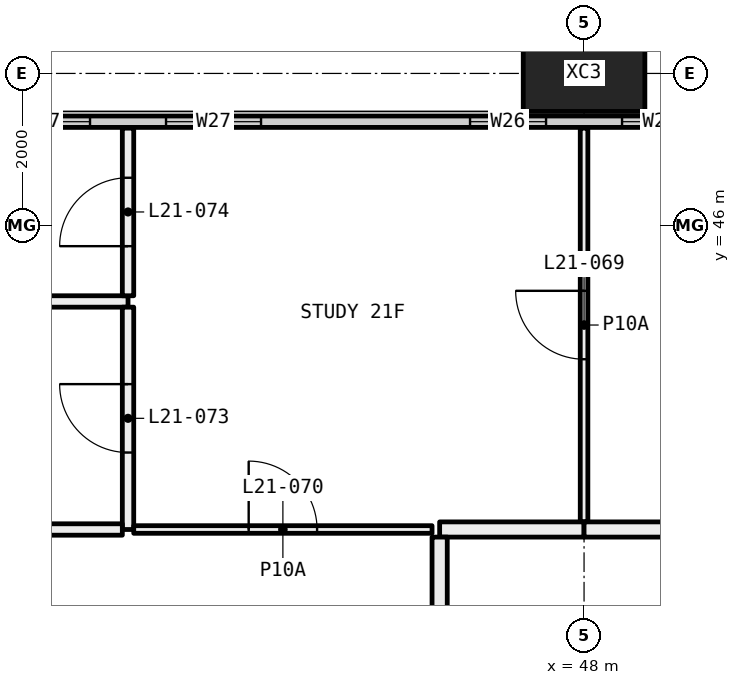
"""IFC4 building model, lengths in metres.
Left out: names, types, materials, properties, quantities, classifications, styles, units other than length and angle.
Written with IfcOpenShell. Run it as: python <this file> out.ifc"""

import sys

from ifc_helpers import new_model, si_unit, direction, frame, frame_2d, origin, origin_2d, place, context, subcontext, project, spatial, rectangle, hollow_rectangle, extrude, element, fill, save


model = new_model("IFC4")
c1 = context("Model", 3, precision=1e-05, world=origin(), true_north=direction((0.0, 1.0)))
c2 = subcontext(c1, "Body", "Model", "MODEL_VIEW")
j1 = project(units=[si_unit("LENGTHUNIT", "METRE"), si_unit("PLANEANGLEUNIT", "RADIAN")], contexts=[c1])
p1 = place(None, origin())
s1 = spatial("IfcSite", under=j1, at=p1, CompositionType="ELEMENT")
p2 = place(p1, origin())
s2 = spatial("IfcBuilding", under=s1, at=p2, CompositionType="ELEMENT")
p3 = place(p2, frame((0.0, 0.0, 85.2)))
s3 = spatial("IfcBuildingStorey", under=s2, at=p3, CompositionType="ELEMENT", Elevation=85.2)
p4 = place(p3, frame((48.0, 48.0, -0.4), z_axis=(0.0, 0.0, 1.0), x_axis=(1.0, 0.0, 0.0)))
e1 = element("IfcColumn", 1, at=p4, inside=s3, PredefinedType="COLUMN", context=c2, shape_type="SweptSolid", body=[
    extrude(hollow_rectangle(XDim=1.6, YDim=1.0, WallThickness=0.065, at=origin_2d()), origin(), (0.0, 0.0, 1.0), 3.45),
])
p5 = place(p3, frame((6.56, 47.365, 0.0), z_axis=(0.0, 0.0, 1.0), x_axis=(1.0, 0.0, 0.0)))
e2 = element("IfcWall", 2, at=p5, inside=s3, PredefinedType="ELEMENTEDWALL", context=c2, shape_type="SweptSolid", body=[
    extrude(rectangle(XDim=58.88, YDim=0.15, at=frame_2d((29.44, 0.0))), origin(), (0.0, 0.0, 1.0), 3.05),
])
p6 = place(p5, frame((0.44, 0.0, 0.45)))
e3 = element("IfcOpeningElement", 3, at=p6, cuts=e2, PredefinedType="OPENING", context=c2, shape_type="SweptSolid", body=[
    extrude(rectangle(XDim=4.5, YDim=2.55, at=frame_2d((2.25, 1.275))), frame((0.0, 0.085, 0.0), z_axis=(0.0, -1.0, 0.0), x_axis=(1.0, 0.0, 0.0)), (0.0, 0.0, 1.0), 0.17),
])
p7 = place(p5, frame((5.94, 0.0, 0.45)))
e4 = element("IfcOpeningElement", 4, at=p7, cuts=e2, PredefinedType="OPENING", context=c2, shape_type="SweptSolid", body=[
    extrude(rectangle(XDim=1.0, YDim=2.55, at=frame_2d((0.5, 1.275))), frame((0.0, 0.085, 0.0), z_axis=(0.0, -1.0, 0.0), x_axis=(1.0, 0.0, 0.0)), (0.0, 0.0, 1.0), 0.17),
])
p8 = place(p5, frame((9.69, 0.0, 0.45)))
e5 = element("IfcOpeningElement", 5, at=p8, cuts=e2, PredefinedType="OPENING", context=c2, shape_type="SweptSolid", body=[
    extrude(rectangle(XDim=1.25, YDim=2.55, at=frame_2d((0.625, 1.275))), frame((0.0, 0.085, 0.0), z_axis=(0.0, -1.0, 0.0), x_axis=(1.0, 0.0, 0.0)), (0.0, 0.0, 1.0), 0.17),
])
p9 = place(p5, frame((11.94, 0.0, 0.45)))
e6 = element("IfcOpeningElement", 6, at=p9, cuts=e2, PredefinedType="OPENING", context=c2, shape_type="SweptSolid", body=[
    extrude(rectangle(XDim=1.25, YDim=2.55, at=frame_2d((0.625, 1.275))), frame((0.0, 0.085, 0.0), z_axis=(0.0, -1.0, 0.0), x_axis=(1.0, 0.0, 0.0)), (0.0, 0.0, 1.0), 0.17),
])
p10 = place(p5, frame((15.94, 0.0, 0.45)))
e7 = element("IfcOpeningElement", 7, at=p10, cuts=e2, PredefinedType="OPENING", context=c2, shape_type="SweptSolid", body=[
    extrude(rectangle(XDim=1.0, YDim=2.55, at=frame_2d((0.5, 1.275))), frame((0.0, 0.085, 0.0), z_axis=(0.0, -1.0, 0.0), x_axis=(1.0, 0.0, 0.0)), (0.0, 0.0, 1.0), 0.17),
])
p11 = place(p5, frame((17.94, 0.0, 0.45)))
e8 = element("IfcOpeningElement", 8, at=p11, cuts=e2, PredefinedType="OPENING", context=c2, shape_type="SweptSolid", body=[
    extrude(rectangle(XDim=1.0, YDim=2.55, at=frame_2d((0.5, 1.275))), frame((0.0, 0.085, 0.0), z_axis=(0.0, -1.0, 0.0), x_axis=(1.0, 0.0, 0.0)), (0.0, 0.0, 1.0), 0.17),
])
p12 = place(p5, frame((21.69, 0.0, 0.45)))
e9 = element("IfcOpeningElement", 9, at=p12, cuts=e2, PredefinedType="OPENING", context=c2, shape_type="SweptSolid", body=[
    extrude(rectangle(XDim=1.25, YDim=2.55, at=frame_2d((0.625, 1.275))), frame((0.0, 0.085, 0.0), z_axis=(0.0, -1.0, 0.0), x_axis=(1.0, 0.0, 0.0)), (0.0, 0.0, 1.0), 0.17),
])
p13 = place(p5, frame((23.94, 0.0, 0.45)))
e10 = element("IfcOpeningElement", 10, at=p13, cuts=e2, PredefinedType="OPENING", context=c2, shape_type="SweptSolid", body=[
    extrude(rectangle(XDim=1.25, YDim=2.55, at=frame_2d((0.625, 1.275))), frame((0.0, 0.085, 0.0), z_axis=(0.0, -1.0, 0.0), x_axis=(1.0, 0.0, 0.0)), (0.0, 0.0, 1.0), 0.17),
])
p14 = place(p5, frame((27.94, 0.0, 0.45)))
e11 = element("IfcOpeningElement", 11, at=p14, cuts=e2, PredefinedType="OPENING", context=c2, shape_type="SweptSolid", body=[
    extrude(rectangle(XDim=1.0, YDim=2.55, at=frame_2d((0.5, 1.275))), frame((0.0, 0.085, 0.0), z_axis=(0.0, -1.0, 0.0), x_axis=(1.0, 0.0, 0.0)), (0.0, 0.0, 1.0), 0.17),
])
p15 = place(p5, frame((29.94, 0.0, 0.45)))
e12 = element("IfcOpeningElement", 12, at=p15, cuts=e2, PredefinedType="OPENING", context=c2, shape_type="SweptSolid", body=[
    extrude(rectangle(XDim=1.0, YDim=2.55, at=frame_2d((0.5, 1.275))), frame((0.0, 0.085, 0.0), z_axis=(0.0, -1.0, 0.0), x_axis=(1.0, 0.0, 0.0)), (0.0, 0.0, 1.0), 0.17),
])
p16 = place(p5, frame((33.69, 0.0, 0.45)))
e13 = element("IfcOpeningElement", 13, at=p16, cuts=e2, PredefinedType="OPENING", context=c2, shape_type="SweptSolid", body=[
    extrude(rectangle(XDim=1.25, YDim=2.55, at=frame_2d((0.625, 1.275))), frame((0.0, 0.085, 0.0), z_axis=(0.0, -1.0, 0.0), x_axis=(1.0, 0.0, 0.0)), (0.0, 0.0, 1.0), 0.17),
])
p17 = place(p5, frame((35.94, 0.0, 0.45)))
e14 = element("IfcOpeningElement", 14, at=p17, cuts=e2, PredefinedType="OPENING", context=c2, shape_type="SweptSolid", body=[
    extrude(rectangle(XDim=1.25, YDim=2.55, at=frame_2d((0.625, 1.275))), frame((0.0, 0.085, 0.0), z_axis=(0.0, -1.0, 0.0), x_axis=(1.0, 0.0, 0.0)), (0.0, 0.0, 1.0), 0.17),
])
p18 = place(p5, frame((39.94, 0.0, 0.45)))
e15 = element("IfcOpeningElement", 15, at=p18, cuts=e2, PredefinedType="OPENING", context=c2, shape_type="SweptSolid", body=[
    extrude(rectangle(XDim=1.0, YDim=2.55, at=frame_2d((0.5, 1.275))), frame((0.0, 0.085, 0.0), z_axis=(0.0, -1.0, 0.0), x_axis=(1.0, 0.0, 0.0)), (0.0, 0.0, 1.0), 0.17),
])
p19 = place(p5, frame((41.94, 0.0, 0.45)))
e16 = element("IfcOpeningElement", 16, at=p19, cuts=e2, PredefinedType="OPENING", context=c2, shape_type="SweptSolid", body=[
    extrude(rectangle(XDim=1.0, YDim=2.55, at=frame_2d((0.5, 1.275))), frame((0.0, 0.085, 0.0), z_axis=(0.0, -1.0, 0.0), x_axis=(1.0, 0.0, 0.0)), (0.0, 0.0, 1.0), 0.17),
])
p20 = place(p5, frame((45.69, 0.0, 0.45)))
e17 = element("IfcOpeningElement", 17, at=p20, cuts=e2, PredefinedType="OPENING", context=c2, shape_type="SweptSolid", body=[
    extrude(rectangle(XDim=1.25, YDim=2.55, at=frame_2d((0.625, 1.275))), frame((0.0, 0.085, 0.0), z_axis=(0.0, -1.0, 0.0), x_axis=(1.0, 0.0, 0.0)), (0.0, 0.0, 1.0), 0.17),
])
p21 = place(p5, frame((47.94, 0.0, 0.45)))
e18 = element("IfcOpeningElement", 18, at=p21, cuts=e2, PredefinedType="OPENING", context=c2, shape_type="SweptSolid", body=[
    extrude(rectangle(XDim=1.25, YDim=2.55, at=frame_2d((0.625, 1.275))), frame((0.0, 0.085, 0.0), z_axis=(0.0, -1.0, 0.0), x_axis=(1.0, 0.0, 0.0)), (0.0, 0.0, 1.0), 0.17),
])
p22 = place(p5, frame((51.94, 0.0, 0.45)))
e19 = element("IfcOpeningElement", 19, at=p22, cuts=e2, PredefinedType="OPENING", context=c2, shape_type="SweptSolid", body=[
    extrude(rectangle(XDim=1.0, YDim=2.55, at=frame_2d((0.5, 1.275))), frame((0.0, 0.085, 0.0), z_axis=(0.0, -1.0, 0.0), x_axis=(1.0, 0.0, 0.0)), (0.0, 0.0, 1.0), 0.17),
])
p23 = place(p5, frame((53.94, 0.0, 0.45)))
e20 = element("IfcOpeningElement", 20, at=p23, cuts=e2, PredefinedType="OPENING", context=c2, shape_type="SweptSolid", body=[
    extrude(rectangle(XDim=4.5, YDim=2.55, at=frame_2d((2.25, 1.275))), frame((0.0, 0.085, 0.0), z_axis=(0.0, -1.0, 0.0), x_axis=(1.0, 0.0, 0.0)), (0.0, 0.0, 1.0), 0.17),
])
p24 = place(p3, frame((42.0, 45.0, 0.0), z_axis=(0.0, 0.0, 1.0), x_axis=(-1.0, 0.0, 0.0)))
e21 = element("IfcWall", 21, at=p24, inside=s3, PredefinedType="PARTITIONING", context=c2, shape_type="SweptSolid", body=[
    extrude(rectangle(XDim=5.9, YDim=0.15, at=frame_2d((2.95, 0.0))), origin(), (0.0, 0.0, 1.0), 3.05),
])
p25 = place(p3, frame((42.0, 42.0, 0.0), z_axis=(0.0, 0.0, 1.0), x_axis=(0.0, 1.0, 0.0)))
e22 = element("IfcWall", 22, at=p25, inside=s3, PredefinedType="PARTITIONING", context=c2, shape_type="SweptSolid", body=[
    extrude(rectangle(XDim=2.925, YDim=0.15, at=frame_2d((1.462, 0.0))), origin(), (0.0, 0.0, 1.0), 3.05),
])
p26 = place(p25, frame((1.012, 0.0, 0.0)))
e23 = element("IfcOpeningElement", 23, at=p26, cuts=e22, PredefinedType="OPENING", context=c2, shape_type="SweptSolid", body=[
    extrude(rectangle(XDim=0.9, YDim=2.1, at=frame_2d((0.45, 1.05))), frame((0.0, 0.085, 0.0), z_axis=(0.0, -1.0, 0.0), x_axis=(1.0, 0.0, 0.0)), (0.0, 0.0, 1.0), 0.17),
])
p27 = place(p3, frame((40.9, 42.0, 0.0), z_axis=(0.0, 0.0, 1.0), x_axis=(1.0, 0.0, 0.0)))
e24 = element("IfcWall", 24, at=p27, inside=s3, PredefinedType="PARTITIONING", context=c2, shape_type="SweptSolid", body=[
    extrude(rectangle(XDim=1.025, YDim=0.15, at=frame_2d((0.513, 0.0))), origin(), (0.0, 0.0, 1.0), 3.05),
])
p28 = place(p3, frame((42.0, 45.075, 0.0), z_axis=(0.0, 0.0, 1.0), x_axis=(0.0, 1.0, 0.0)))
e25 = element("IfcWall", 25, at=p28, inside=s3, PredefinedType="PARTITIONING", context=c2, shape_type="SweptSolid", body=[
    extrude(rectangle(XDim=2.205, YDim=0.15, at=frame_2d((1.103, 0.0))), origin(), (0.0, 0.0, 1.0), 3.05),
])
p29 = place(p28, frame((0.653, 0.0, 0.0)))
e26 = element("IfcOpeningElement", 26, at=p29, cuts=e25, PredefinedType="OPENING", context=c2, shape_type="SweptSolid", body=[
    extrude(rectangle(XDim=0.9, YDim=2.1, at=frame_2d((0.45, 1.05))), frame((0.0, 0.085, 0.0), z_axis=(0.0, -1.0, 0.0), x_axis=(1.0, 0.0, 0.0)), (0.0, 0.0, 1.0), 0.17),
])
p30 = place(p3, frame((48.0, 42.1, 0.0), z_axis=(0.0, 0.0, 1.0), x_axis=(0.0, 1.0, 0.0)))
e27 = element("IfcWall", 27, at=p30, inside=s3, PredefinedType="PARTITIONING", context=c2, shape_type="SweptSolid", body=[
    extrude(rectangle(XDim=5.18, YDim=0.1, at=frame_2d((2.59, 0.0))), origin(), (0.0, 0.0, 1.0), 3.05),
])
p31 = place(p30, frame((2.14, 0.0, 0.0)))
e28 = element("IfcOpeningElement", 28, at=p31, cuts=e27, PredefinedType="OPENING", context=c2, shape_type="SweptSolid", body=[
    extrude(rectangle(XDim=0.9, YDim=2.1, at=frame_2d((0.45, 1.05))), frame((0.0, 0.06, 0.0), z_axis=(0.0, -1.0, 0.0), x_axis=(1.0, 0.0, 0.0)), (0.0, 0.0, 1.0), 0.12),
])
p32 = place(p3, frame((42.075, 42.0, 0.0), z_axis=(0.0, 0.0, 1.0), x_axis=(1.0, 0.0, 0.0)))
e29 = element("IfcWall", 29, at=p32, inside=s3, PredefinedType="PARTITIONING", context=c2, shape_type="SweptSolid", body=[
    extrude(rectangle(XDim=3.925, YDim=0.1, at=frame_2d((1.962, 0.0))), origin(), (0.0, 0.0, 1.0), 3.05),
])
p33 = place(p32, frame((1.512, 0.0, 0.0)))
e30 = element("IfcOpeningElement", 30, at=p33, cuts=e29, PredefinedType="OPENING", context=c2, shape_type="SweptSolid", body=[
    extrude(rectangle(XDim=0.9, YDim=2.1, at=frame_2d((0.45, 1.05))), frame((0.0, 0.06, 0.0), z_axis=(0.0, -1.0, 0.0), x_axis=(1.0, 0.0, 0.0)), (0.0, 0.0, 1.0), 0.12),
])
p34 = place(p3, frame((46.1, 42.0, 0.0), z_axis=(0.0, 0.0, 1.0), x_axis=(1.0, 0.0, 0.0)))
e31 = element("IfcWall", 31, at=p34, inside=s3, PredefinedType="PARTITIONING", context=c2, shape_type="SweptSolid", body=[
    extrude(rectangle(XDim=1.9, YDim=0.2, at=frame_2d((0.95, 0.0))), origin(), (0.0, 0.0, 1.0), 3.05),
])
p35 = place(p3, frame((48.0, 42.0, 0.0), z_axis=(0.0, 0.0, 1.0), x_axis=(1.0, 0.0, 0.0)))
e32 = element("IfcWall", 32, at=p35, inside=s3, PredefinedType="PARTITIONING", context=c2, shape_type="SweptSolid", body=[
    extrude(rectangle(XDim=6.0, YDim=0.2, at=frame_2d((3.0, 0.0))), origin(), (0.0, 0.0, 1.0), 3.05),
])
p36 = place(p3, frame((46.1, 36.1, 0.0), z_axis=(0.0, 0.0, 1.0), x_axis=(0.0, 1.0, 0.0)))
e33 = element("IfcWall", 33, at=p36, inside=s3, PredefinedType="PARTITIONING", context=c2, shape_type="SweptSolid", body=[
    extrude(rectangle(XDim=5.8, YDim=0.2, at=frame_2d((2.9, 0.0))), origin(), (0.0, 0.0, 1.0), 3.05),
])
p37 = place(p16, origin())
e34 = element("IfcWindow", 34, at=p37, inside=s3, PartitioningType="SINGLE_PANEL", PredefinedType="WINDOW", context=c2, shape_type="SweptSolid", body=[
    extrude(rectangle(XDim=1.25, YDim=2.55, at=frame_2d((0.625, 1.275))), frame((0.0, 0.03, 0.0), z_axis=(0.0, -1.0, 0.0), x_axis=(1.0, 0.0, 0.0)), (0.0, 0.0, 1.0), 0.06),
])
fill(e13, e34)
p38 = place(p17, origin())
e35 = element("IfcWindow", 35, at=p38, inside=s3, PartitioningType="SINGLE_PANEL", PredefinedType="WINDOW", context=c2, shape_type="SweptSolid", body=[
    extrude(rectangle(XDim=1.25, YDim=2.55, at=frame_2d((0.625, 1.275))), frame((0.0, 0.03, 0.0), z_axis=(0.0, -1.0, 0.0), x_axis=(1.0, 0.0, 0.0)), (0.0, 0.0, 1.0), 0.06),
])
fill(e14, e35)
p39 = place(p18, origin())
e36 = element("IfcWindow", 36, at=p39, inside=s3, PartitioningType="SINGLE_PANEL", PredefinedType="WINDOW", context=c2, shape_type="SweptSolid", body=[
    extrude(rectangle(XDim=1.0, YDim=2.55, at=frame_2d((0.5, 1.275))), frame((0.0, 0.03, 0.0), z_axis=(0.0, -1.0, 0.0), x_axis=(1.0, 0.0, 0.0)), (0.0, 0.0, 1.0), 0.06),
])
fill(e15, e36)
p40 = place(p19, origin())
e37 = element("IfcWindow", 37, at=p40, inside=s3, PartitioningType="SINGLE_PANEL", PredefinedType="WINDOW", context=c2, shape_type="SweptSolid", body=[
    extrude(rectangle(XDim=1.0, YDim=2.55, at=frame_2d((0.5, 1.275))), frame((0.0, 0.03, 0.0), z_axis=(0.0, -1.0, 0.0), x_axis=(1.0, 0.0, 0.0)), (0.0, 0.0, 1.0), 0.06),
])
fill(e16, e37)
p41 = place(p31, origin())
e38 = element("IfcDoor", 38, at=p41, inside=s3, OperationType="SINGLE_SWING_LEFT", PredefinedType="DOOR", context=c2, shape_type="SweptSolid", body=[
    extrude(rectangle(XDim=0.9, YDim=2.1, at=frame_2d((0.45, 1.05))), frame((0.0, 0.025, 0.0), z_axis=(0.0, -1.0, 0.0), x_axis=(1.0, 0.0, 0.0)), (0.0, 0.0, 1.0), 0.05),
])
fill(e28, e38)
p42 = place(p33, origin())
e39 = element("IfcDoor", 39, at=p42, inside=s3, OperationType="SINGLE_SWING_RIGHT", PredefinedType="DOOR", context=c2, shape_type="SweptSolid", body=[
    extrude(rectangle(XDim=0.9, YDim=2.1, at=frame_2d((0.45, 1.05))), frame((0.0, 0.025, 0.0), z_axis=(0.0, -1.0, 0.0), x_axis=(1.0, 0.0, 0.0)), (0.0, 0.0, 1.0), 0.05),
])
fill(e30, e39)
p43 = place(p26, origin())
e40 = element("IfcDoor", 40, at=p43, inside=s3, OperationType="SINGLE_SWING_LEFT", PredefinedType="DOOR", context=c2, shape_type="SweptSolid", body=[
    extrude(rectangle(XDim=0.9, YDim=2.1, at=frame_2d((0.45, 1.05))), frame((0.0, 0.025, 0.0), z_axis=(0.0, -1.0, 0.0), x_axis=(1.0, 0.0, 0.0)), (0.0, 0.0, 1.0), 0.05),
])
fill(e23, e40)
p44 = place(p29, origin())
e41 = element("IfcDoor", 41, at=p44, inside=s3, OperationType="SINGLE_SWING_RIGHT", PredefinedType="DOOR", context=c2, shape_type="SweptSolid", body=[
    extrude(rectangle(XDim=0.9, YDim=2.1, at=frame_2d((0.45, 1.05))), frame((0.0, 0.025, 0.0), z_axis=(0.0, -1.0, 0.0), x_axis=(1.0, 0.0, 0.0)), (0.0, 0.0, 1.0), 0.05),
])
fill(e26, e41)
save(model, sys.argv[1])
